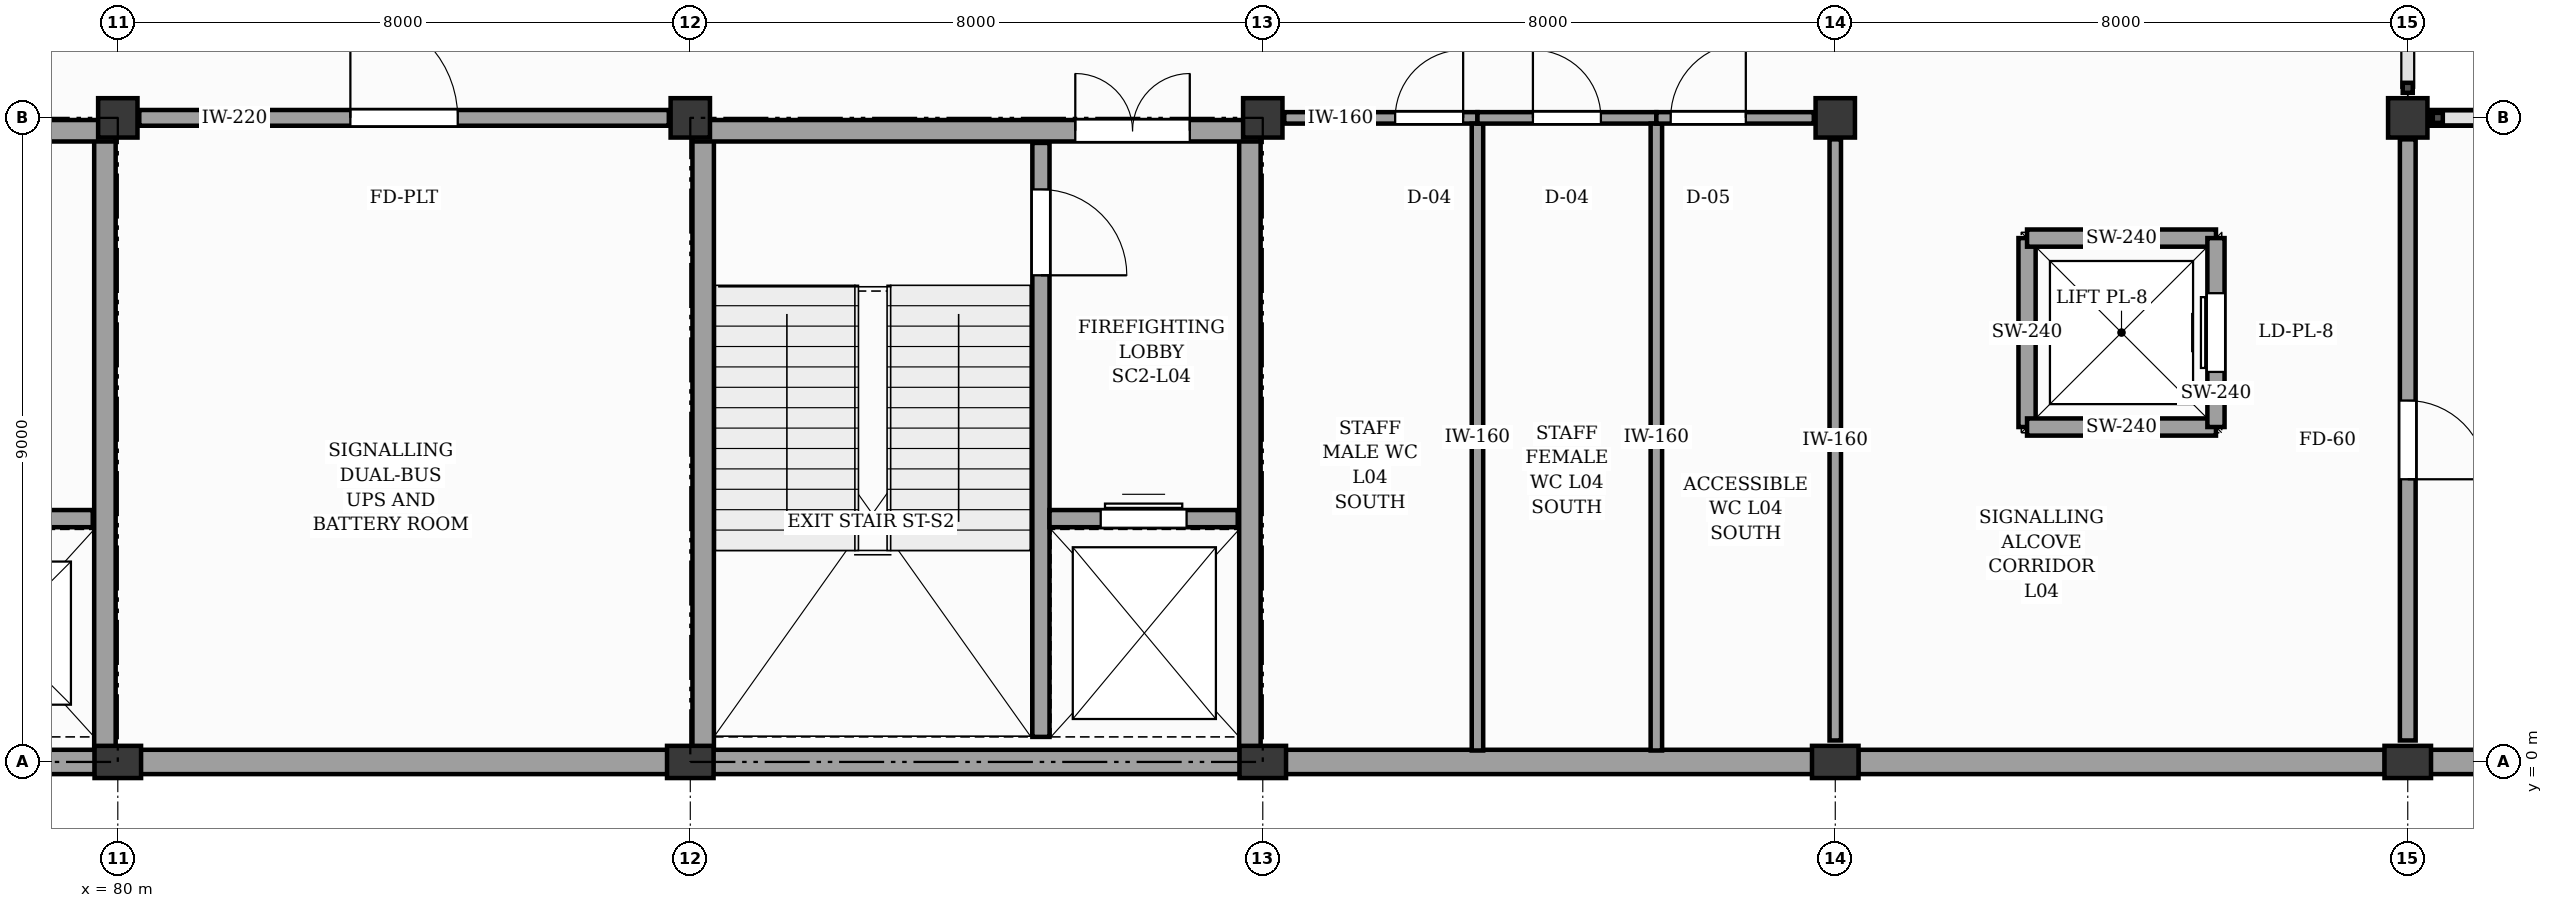
"""IFC4 building model, lengths in metres.
Left out: names, types, materials, properties, quantities, classifications, styles, units other than length and angle.
Written with IfcOpenShell. Run it as: python <this file> out.ifc"""

import sys

from ifc_helpers import new_model, si_unit, direction, frame, frame_2d, origin, origin_2d, place, context, subcontext, project, spatial, rectangle, extrude, element, fill, save


model = new_model("IFC4")
c1 = context("Model", 3, precision=1e-05, world=origin(), true_north=direction((0.0, 1.0)))
c2 = subcontext(c1, "Body", "Model", "MODEL_VIEW")
j1 = project(units=[si_unit("LENGTHUNIT", "METRE"), si_unit("PLANEANGLEUNIT", "RADIAN")], contexts=[c1])
p1 = place(None, origin())
s1 = spatial("IfcSite", under=j1, at=p1, CompositionType="ELEMENT")
p2 = place(p1, origin())
s2 = spatial("IfcBuilding", under=s1, at=p2, CompositionType="ELEMENT")
p3 = place(p2, frame((0.0, 0.0, 20.4)))
s3 = spatial("IfcBuildingStorey", under=s2, at=p3, CompositionType="ELEMENT", Elevation=20.4)
p4 = place(p3, frame((80.0, 0.0, 0.0), z_axis=(0.0, 0.0, 1.0), x_axis=(1.0, 0.0, 0.0)))
e1 = element("IfcColumn", 1, at=p4, inside=s3, PredefinedType="PILASTER", context=c2, shape_type="SweptSolid", body=[
    extrude(rectangle(XDim=0.65, YDim=0.45, at=origin_2d()), origin(), (0.0, 0.0, 1.0), 4.2),
])
p5 = place(p3, frame((80.0, 9.0, 0.0), z_axis=(0.0, 0.0, 1.0), x_axis=(1.0, 0.0, 0.0)))
e2 = element("IfcColumn", 2, at=p5, inside=s3, PredefinedType="COLUMN", context=c2, shape_type="SweptSolid", body=[
    extrude(rectangle(XDim=0.55, YDim=0.55, at=origin_2d()), origin(), (0.0, 0.0, 1.0), 4.2),
])
p6 = place(p3, frame((88.0, 0.0, 0.0), z_axis=(0.0, 0.0, 1.0), x_axis=(1.0, 0.0, 0.0)))
e3 = element("IfcColumn", 3, at=p6, inside=s3, PredefinedType="PILASTER", context=c2, shape_type="SweptSolid", body=[
    extrude(rectangle(XDim=0.65, YDim=0.45, at=origin_2d()), origin(), (0.0, 0.0, 1.0), 4.2),
])
p7 = place(p3, frame((88.0, 9.0, 0.0), z_axis=(0.0, 0.0, 1.0), x_axis=(1.0, 0.0, 0.0)))
e4 = element("IfcColumn", 4, at=p7, inside=s3, PredefinedType="COLUMN", context=c2, shape_type="SweptSolid", body=[
    extrude(rectangle(XDim=0.55, YDim=0.55, at=origin_2d()), origin(), (0.0, 0.0, 1.0), 4.2),
])
p8 = place(p3, frame((96.0, 0.0, 0.0), z_axis=(0.0, 0.0, 1.0), x_axis=(1.0, 0.0, 0.0)))
e5 = element("IfcColumn", 5, at=p8, inside=s3, PredefinedType="PILASTER", context=c2, shape_type="SweptSolid", body=[
    extrude(rectangle(XDim=0.65, YDim=0.45, at=origin_2d()), origin(), (0.0, 0.0, 1.0), 4.2),
])
p9 = place(p3, frame((96.0, 9.0, 0.0), z_axis=(0.0, 0.0, 1.0), x_axis=(1.0, 0.0, 0.0)))
e6 = element("IfcColumn", 6, at=p9, inside=s3, PredefinedType="COLUMN", context=c2, shape_type="SweptSolid", body=[
    extrude(rectangle(XDim=0.55, YDim=0.55, at=origin_2d()), origin(), (0.0, 0.0, 1.0), 4.2),
])
p10 = place(p3, frame((104.0, 0.0, 0.0), z_axis=(0.0, 0.0, 1.0), x_axis=(1.0, 0.0, 0.0)))
e7 = element("IfcColumn", 7, at=p10, inside=s3, PredefinedType="PILASTER", context=c2, shape_type="SweptSolid", body=[
    extrude(rectangle(XDim=0.65, YDim=0.45, at=origin_2d()), origin(), (0.0, 0.0, 1.0), 4.2),
])
p11 = place(p3, frame((104.0, 9.0, 0.0), z_axis=(0.0, 0.0, 1.0), x_axis=(1.0, 0.0, 0.0)))
e8 = element("IfcColumn", 8, at=p11, inside=s3, PredefinedType="COLUMN", context=c2, shape_type="SweptSolid", body=[
    extrude(rectangle(XDim=0.55, YDim=0.55, at=origin_2d()), origin(), (0.0, 0.0, 1.0), 4.2),
])
p12 = place(p3, frame((112.0, 0.0, 0.0), z_axis=(0.0, 0.0, 1.0), x_axis=(1.0, 0.0, 0.0)))
e9 = element("IfcColumn", 9, at=p12, inside=s3, PredefinedType="PILASTER", context=c2, shape_type="SweptSolid", body=[
    extrude(rectangle(XDim=0.65, YDim=0.45, at=origin_2d()), origin(), (0.0, 0.0, 1.0), 4.2),
])
p13 = place(p3, frame((112.0, 9.0, 0.0), z_axis=(0.0, 0.0, 1.0), x_axis=(1.0, 0.0, 0.0)))
e10 = element("IfcColumn", 10, at=p13, inside=s3, PredefinedType="COLUMN", context=c2, shape_type="SweptSolid", body=[
    extrude(rectangle(XDim=0.55, YDim=0.55, at=origin_2d()), origin(), (0.0, 0.0, 1.0), 4.2),
])
for number, where, z_axis, x_axis in (
    (11, (72.32, 0.0, 0.0), (0.0, 0.0, 1.0), (1.0, 0.0, 0.0)),
    (12, (80.32, 0.0, 0.0), (0.0, 0.0, 1.0), (1.0, 0.0, 0.0)),
    (13, (88.32, 0.0, 0.0), (0.0, 0.0, 1.0), (1.0, 0.0, 0.0)),
    (14, (96.32, 0.0, 0.0), (0.0, 0.0, 1.0), (1.0, 0.0, 0.0)),
    (15, (104.32, 0.0, 0.0), (0.0, 0.0, 1.0), (1.0, 0.0, 0.0)),
    (16, (112.32, 0.0, 0.0), (0.0, 0.0, 1.0), (1.0, 0.0, 0.0)),
):
    element("IfcWall", number, at=place(p3, frame(where, z_axis=z_axis, x_axis=x_axis)), inside=s3, PredefinedType="SOLIDWALL", context=c2, shape_type="SweptSolid", body=[
        extrude(rectangle(XDim=7.36, YDim=0.34, at=frame_2d((3.68, 0.0))), origin(), (0.0, 0.0, 1.0), 3.18),
    ])
p14 = place(p3, frame((92.9, 0.35, 0.0), z_axis=(0.0, 0.0, 1.0), x_axis=(0.0, 1.0, 0.0)))
e17 = element("IfcWall", 17, at=p14, inside=s3, PredefinedType="SHEAR", context=c2, shape_type="SweptSolid", body=[
    extrude(rectangle(XDim=8.3, YDim=0.24, at=frame_2d((4.15, 0.0))), origin(), (0.0, 0.0, 1.0), 3.92),
])
p15 = place(p14, frame((6.45, 0.0, 0.0)))
e18 = element("IfcOpeningElement", 18, at=p15, cuts=e17, PredefinedType="OPENING", context=c2, shape_type="SweptSolid", body=[
    extrude(rectangle(XDim=1.2, YDim=2.15, at=frame_2d((0.6, 1.075))), frame((0.0, 0.13, 0.0), z_axis=(0.0, -1.0, 0.0), x_axis=(1.0, 0.0, 0.0)), (0.0, 0.0, 1.0), 0.26),
])
p16 = place(p3, frame((93.02, 3.4, 0.0), z_axis=(0.0, 0.0, 1.0), x_axis=(1.0, 0.0, 0.0)))
e19 = element("IfcWall", 19, at=p16, inside=s3, PredefinedType="SHEAR", context=c2, shape_type="SweptSolid", body=[
    extrude(rectangle(XDim=2.63, YDim=0.24, at=frame_2d((1.315, 0.0))), origin(), (0.0, 0.0, 1.0), 3.92),
])
p17 = place(p16, frame((0.715, 0.0, 0.0)))
e20 = element("IfcOpeningElement", 20, at=p17, cuts=e19, PredefinedType="OPENING", context=c2, shape_type="SweptSolid", body=[
    extrude(rectangle(XDim=1.2, YDim=2.15, at=frame_2d((0.6, 1.075))), frame((0.0, 0.13, 0.0), z_axis=(0.0, -1.0, 0.0), x_axis=(1.0, 0.0, 0.0)), (0.0, 0.0, 1.0), 0.26),
])
for number, where, z_axis, x_axis in (
    (21, (88.18, 0.18, 0.0), (0.0, 0.0, 1.0), (0.0, 1.0, 0.0)),
    (22, (95.82, 0.18, 0.0), (0.0, 0.0, 1.0), (0.0, 1.0, 0.0)),
):
    element("IfcWall", number, at=place(p3, frame(where, z_axis=z_axis, x_axis=x_axis)), inside=s3, PredefinedType="SHEAR", context=c2, shape_type="SweptSolid", body=[
        extrude(rectangle(XDim=8.64, YDim=0.3, at=frame_2d((4.32, 0.0))), origin(), (0.0, 0.0, 1.0), 3.92),
    ])
p18 = place(p3, frame((88.03, 8.82, 0.0), z_axis=(0.0, 0.0, 1.0), x_axis=(1.0, 0.0, 0.0)))
e23 = element("IfcWall", 23, at=p18, inside=s3, PredefinedType="SHEAR", context=c2, shape_type="SweptSolid", body=[
    extrude(rectangle(XDim=7.94, YDim=0.3, at=frame_2d((3.97, 0.0))), origin(), (0.0, 0.0, 1.0), 3.92),
])
p19 = place(p18, frame((5.35, 0.0, 0.0)))
e24 = element("IfcOpeningElement", 24, at=p19, cuts=e23, PredefinedType="OPENING", context=c2, shape_type="SweptSolid", body=[
    extrude(rectangle(XDim=1.6, YDim=2.15, at=frame_2d((0.8, 1.075))), frame((0.0, 0.16, 0.0), z_axis=(0.0, -1.0, 0.0), x_axis=(1.0, 0.0, 0.0)), (0.0, 0.0, 1.0), 0.32),
])
p20 = place(p3, frame((77.02, 3.4, 0.0), z_axis=(0.0, 0.0, 1.0), x_axis=(1.0, 0.0, 0.0)))
e25 = element("IfcWall", 25, at=p20, inside=s3, PredefinedType="SHEAR", context=c2, shape_type="SweptSolid", body=[
    extrude(rectangle(XDim=2.63, YDim=0.24, at=frame_2d((1.315, 0.0))), origin(), (0.0, 0.0, 1.0), 3.98),
])
p21 = place(p20, frame((0.765, 0.0, 0.0)))
e26 = element("IfcOpeningElement", 26, at=p21, cuts=e25, PredefinedType="OPENING", context=c2, shape_type="SweptSolid", body=[
    extrude(rectangle(XDim=1.1, YDim=2.15, at=frame_2d((0.55, 1.075))), frame((0.0, 0.13, 0.0), z_axis=(0.0, -1.0, 0.0), x_axis=(1.0, 0.0, 0.0)), (0.0, 0.0, 1.0), 0.26),
])
p22 = place(p3, frame((79.82, 0.18, 0.0), z_axis=(0.0, 0.0, 1.0), x_axis=(0.0, 1.0, 0.0)))
e27 = element("IfcWall", 27, at=p22, inside=s3, PredefinedType="SHEAR", context=c2, shape_type="SweptSolid", body=[
    extrude(rectangle(XDim=8.64, YDim=0.3, at=frame_2d((4.32, 0.0))), origin(), (0.0, 0.0, 1.0), 3.98),
])
p23 = place(p3, frame((72.03, 8.82, 0.0), z_axis=(0.0, 0.0, 1.0), x_axis=(1.0, 0.0, 0.0)))
e28 = element("IfcWall", 28, at=p23, inside=s3, PredefinedType="SHEAR", context=c2, shape_type="SweptSolid", body=[
    extrude(rectangle(XDim=7.94, YDim=0.3, at=frame_2d((3.97, 0.0))), origin(), (0.0, 0.0, 1.0), 3.98),
])
p24 = place(p23, frame((5.35, 0.0, 0.0)))
e29 = element("IfcOpeningElement", 29, at=p24, cuts=e28, PredefinedType="OPENING", context=c2, shape_type="SweptSolid", body=[
    extrude(rectangle(XDim=1.6, YDim=2.15, at=frame_2d((0.8, 1.075))), frame((0.0, 0.16, 0.0), z_axis=(0.0, -1.0, 0.0), x_axis=(1.0, 0.0, 0.0)), (0.0, 0.0, 1.0), 0.32),
])
for number, where, z_axis, x_axis in (
    (30, (106.68, 4.68, 0.0), (0.0, 0.0, 1.0), (0.0, 1.0, 0.0)),
    (31, (106.68, 4.68, 0.0), (0.0, 0.0, 1.0), (1.0, 0.0, 0.0)),
    (32, (106.68, 7.32, 0.0), (0.0, 0.0, 1.0), (1.0, 0.0, 0.0)),
):
    element("IfcWall", number, at=place(p3, frame(where, z_axis=z_axis, x_axis=x_axis)), inside=s3, PredefinedType="SHEAR", context=c2, shape_type="SweptSolid", body=[
        extrude(rectangle(XDim=2.64, YDim=0.24, at=frame_2d((1.32, 0.0))), origin(), (0.0, 0.0, 1.0), 3.92),
    ])
p25 = place(p3, frame((109.32, 4.68, 0.0), z_axis=(0.0, 0.0, 1.0), x_axis=(0.0, 1.0, 0.0)))
e33 = element("IfcWall", 33, at=p25, inside=s3, PredefinedType="SHEAR", context=c2, shape_type="SweptSolid", body=[
    extrude(rectangle(XDim=2.64, YDim=0.24, at=frame_2d((1.32, 0.0))), origin(), (0.0, 0.0, 1.0), 3.92),
])
p26 = place(p25, frame((0.77, 0.0, 0.0)))
e34 = element("IfcOpeningElement", 34, at=p26, cuts=e33, PredefinedType="OPENING", context=c2, shape_type="SweptSolid", body=[
    extrude(rectangle(XDim=1.1, YDim=2.15, at=frame_2d((0.55, 1.075))), frame((0.0, 0.13, 0.0), z_axis=(0.0, -1.0, 0.0), x_axis=(1.0, 0.0, 0.0)), (0.0, 0.0, 1.0), 0.26),
])
p27 = place(p3, frame((80.3, 9.0, 0.0), z_axis=(0.0, 0.0, 1.0), x_axis=(1.0, 0.0, 0.0)))
e35 = element("IfcWall", 35, at=p27, inside=s3, PredefinedType="SOLIDWALL", context=c2, shape_type="SweptSolid", body=[
    extrude(rectangle(XDim=7.4, YDim=0.22, at=frame_2d((3.7, 0.0))), origin(), (0.0, 0.0, 1.0), 3.1),
])
p28 = place(p27, frame((2.95, 0.0, 0.0)))
e36 = element("IfcOpeningElement", 36, at=p28, cuts=e35, PredefinedType="OPENING", context=c2, shape_type="SweptSolid", body=[
    extrude(rectangle(XDim=1.5, YDim=2.2, at=frame_2d((0.75, 1.1))), frame((0.0, 0.12, 0.0), z_axis=(0.0, -1.0, 0.0), x_axis=(1.0, 0.0, 0.0)), (0.0, 0.0, 1.0), 0.24),
])
p29 = place(p3, frame((96.3, 9.0, 0.0), z_axis=(0.0, 0.0, 1.0), x_axis=(1.0, 0.0, 0.0)))
e37 = element("IfcWall", 37, at=p29, inside=s3, PredefinedType="PARTITIONING", context=c2, shape_type="SweptSolid", body=[
    extrude(rectangle(XDim=2.7, YDim=0.16, at=frame_2d((1.35, 0.0))), origin(), (0.0, 0.0, 1.0), 3.1),
])
p30 = place(p29, frame((1.55, 0.0, 0.0)))
e38 = element("IfcOpeningElement", 38, at=p30, cuts=e37, PredefinedType="OPENING", context=c2, shape_type="SweptSolid", body=[
    extrude(rectangle(XDim=0.95, YDim=2.1, at=frame_2d((0.475, 1.05))), frame((0.0, 0.09, 0.0), z_axis=(0.0, -1.0, 0.0), x_axis=(1.0, 0.0, 0.0)), (0.0, 0.0, 1.0), 0.18),
])
p31 = place(p3, frame((99.0, 0.16, 0.0), z_axis=(0.0, 0.0, 1.0), x_axis=(0.0, 1.0, 0.0)))
e39 = element("IfcWall", 39, at=p31, inside=s3, PredefinedType="PARTITIONING", context=c2, shape_type="SweptSolid", body=[
    extrude(rectangle(XDim=8.76, YDim=0.16, at=frame_2d((4.38, 0.0))), origin(), (0.0, 0.0, 1.0), 3.1),
])
p32 = place(p3, frame((99.0, 9.0, 0.0), z_axis=(0.0, 0.0, 1.0), x_axis=(1.0, 0.0, 0.0)))
e40 = element("IfcWall", 40, at=p32, inside=s3, PredefinedType="PARTITIONING", context=c2, shape_type="SweptSolid", body=[
    extrude(rectangle(XDim=2.5, YDim=0.16, at=frame_2d((1.25, 0.0))), origin(), (0.0, 0.0, 1.0), 3.1),
])
p33 = place(p32, frame((0.775, 0.0, 0.0)))
e41 = element("IfcOpeningElement", 41, at=p33, cuts=e40, PredefinedType="OPENING", context=c2, shape_type="SweptSolid", body=[
    extrude(rectangle(XDim=0.95, YDim=2.1, at=frame_2d((0.475, 1.05))), frame((0.0, 0.09, 0.0), z_axis=(0.0, -1.0, 0.0), x_axis=(1.0, 0.0, 0.0)), (0.0, 0.0, 1.0), 0.18),
])
p34 = place(p3, frame((101.5, 0.16, 0.0), z_axis=(0.0, 0.0, 1.0), x_axis=(0.0, 1.0, 0.0)))
e42 = element("IfcWall", 42, at=p34, inside=s3, PredefinedType="PARTITIONING", context=c2, shape_type="SweptSolid", body=[
    extrude(rectangle(XDim=8.76, YDim=0.16, at=frame_2d((4.38, 0.0))), origin(), (0.0, 0.0, 1.0), 3.1),
])
p35 = place(p3, frame((101.5, 9.0, 0.0), z_axis=(0.0, 0.0, 1.0), x_axis=(1.0, 0.0, 0.0)))
e43 = element("IfcWall", 43, at=p35, inside=s3, PredefinedType="PARTITIONING", context=c2, shape_type="SweptSolid", body=[
    extrude(rectangle(XDim=2.2, YDim=0.16, at=frame_2d((1.1, 0.0))), origin(), (0.0, 0.0, 1.0), 3.1),
])
p36 = place(p35, frame((0.2, 0.0, 0.0)))
e44 = element("IfcOpeningElement", 44, at=p36, cuts=e43, PredefinedType="OPENING", context=c2, shape_type="SweptSolid", body=[
    extrude(rectangle(XDim=1.05, YDim=2.1, at=frame_2d((0.525, 1.05))), frame((0.0, 0.09, 0.0), z_axis=(0.0, -1.0, 0.0), x_axis=(1.0, 0.0, 0.0)), (0.0, 0.0, 1.0), 0.18),
])
p37 = place(p3, frame((104.0, 0.3, 0.0), z_axis=(0.0, 0.0, 1.0), x_axis=(0.0, 1.0, 0.0)))
e45 = element("IfcWall", 45, at=p37, inside=s3, PredefinedType="PARTITIONING", context=c2, shape_type="SweptSolid", body=[
    extrude(rectangle(XDim=8.4, YDim=0.16, at=frame_2d((4.2, 0.0))), origin(), (0.0, 0.0, 1.0), 3.1),
])
p38 = place(p3, frame((112.3, 9.0, 0.0), z_axis=(0.0, 0.0, 1.0), x_axis=(1.0, 0.0, 0.0)))
e46 = element("IfcWall", 46, at=p38, inside=s3, PredefinedType="SOLIDWALL", context=c2, shape_type="SweptSolid", body=[
    extrude(rectangle(XDim=7.4, YDim=0.22, at=frame_2d((3.7, 0.0))), origin(), (0.0, 0.0, 1.0), 3.1),
])
p39 = place(p3, frame((112.0, 0.3, 0.0), z_axis=(0.0, 0.0, 1.0), x_axis=(0.0, 1.0, 0.0)))
e47 = element("IfcWall", 47, at=p39, inside=s3, PredefinedType="SOLIDWALL", context=c2, shape_type="SweptSolid", body=[
    extrude(rectangle(XDim=8.4, YDim=0.22, at=frame_2d((4.2, 0.0))), origin(), (0.0, 0.0, 1.0), 3.1),
])
p40 = place(p39, frame((3.65, 0.0, 0.0)))
e48 = element("IfcOpeningElement", 48, at=p40, cuts=e47, PredefinedType="OPENING", context=c2, shape_type="SweptSolid", body=[
    extrude(rectangle(XDim=1.1, YDim=2.15, at=frame_2d((0.55, 1.075))), frame((0.0, 0.12, 0.0), z_axis=(0.0, -1.0, 0.0), x_axis=(1.0, 0.0, 0.0)), (0.0, 0.0, 1.0), 0.24),
])
p41 = place(p15, frame((1.2, 0.0, 0.0), z_axis=(0.0, 0.0, 1.0), x_axis=(-1.0, 0.0, 0.0)))
e49 = element("IfcDoor", 49, at=p41, inside=s3, OperationType="SINGLE_SWING_LEFT", PredefinedType="DOOR", context=c2, shape_type="SweptSolid", body=[
    extrude(rectangle(XDim=1.2, YDim=2.15, at=frame_2d((0.6, 1.075))), frame((0.0, 0.025, 0.0), z_axis=(0.0, -1.0, 0.0), x_axis=(1.0, 0.0, 0.0)), (0.0, 0.0, 1.0), 0.05),
])
fill(e18, e49)
p42 = place(p17, origin())
e50 = element("IfcDoor", 50, at=p42, inside=s3, OperationType="DOUBLE_DOOR_SLIDING", PredefinedType="DOOR", context=c2, shape_type="SweptSolid", body=[
    extrude(rectangle(XDim=1.2, YDim=2.15, at=frame_2d((0.6, 1.075))), frame((0.0, 0.025, 0.0), z_axis=(0.0, -1.0, 0.0), x_axis=(1.0, 0.0, 0.0)), (0.0, 0.0, 1.0), 0.05),
])
fill(e20, e50)
p43 = place(p19, origin())
e51 = element("IfcDoor", 51, at=p43, inside=s3, OperationType="DOUBLE_DOOR_SINGLE_SWING", PredefinedType="DOOR", context=c2, shape_type="SweptSolid", body=[
    extrude(rectangle(XDim=1.6, YDim=2.15, at=frame_2d((0.8, 1.075))), frame((0.0, 0.025, 0.0), z_axis=(0.0, -1.0, 0.0), x_axis=(1.0, 0.0, 0.0)), (0.0, 0.0, 1.0), 0.05),
])
fill(e24, e51)
p44 = place(p26, origin())
e52 = element("IfcDoor", 52, at=p44, inside=s3, OperationType="DOUBLE_DOOR_SLIDING", PredefinedType="DOOR", context=c2, shape_type="SweptSolid", body=[
    extrude(rectangle(XDim=1.1, YDim=2.15, at=frame_2d((0.55, 1.075))), frame((0.0, 0.025, 0.0), z_axis=(0.0, -1.0, 0.0), x_axis=(1.0, 0.0, 0.0)), (0.0, 0.0, 1.0), 0.05),
])
fill(e34, e52)
p45 = place(p28, origin())
e53 = element("IfcDoor", 53, at=p45, inside=s3, OperationType="SINGLE_SWING_LEFT", PredefinedType="DOOR", context=c2, shape_type="SweptSolid", body=[
    extrude(rectangle(XDim=1.5, YDim=2.2, at=frame_2d((0.75, 1.1))), frame((0.0, 0.025, 0.0), z_axis=(0.0, -1.0, 0.0), x_axis=(1.0, 0.0, 0.0)), (0.0, 0.0, 1.0), 0.05),
])
fill(e36, e53)
p46 = place(p30, origin())
e54 = element("IfcDoor", 54, at=p46, inside=s3, OperationType="SINGLE_SWING_RIGHT", PredefinedType="DOOR", context=c2, shape_type="SweptSolid", body=[
    extrude(rectangle(XDim=0.95, YDim=2.1, at=frame_2d((0.475, 1.05))), frame((0.0, 0.025, 0.0), z_axis=(0.0, -1.0, 0.0), x_axis=(1.0, 0.0, 0.0)), (0.0, 0.0, 1.0), 0.05),
])
fill(e38, e54)
p47 = place(p33, origin())
e55 = element("IfcDoor", 55, at=p47, inside=s3, OperationType="SINGLE_SWING_LEFT", PredefinedType="DOOR", context=c2, shape_type="SweptSolid", body=[
    extrude(rectangle(XDim=0.95, YDim=2.1, at=frame_2d((0.475, 1.05))), frame((0.0, 0.025, 0.0), z_axis=(0.0, -1.0, 0.0), x_axis=(1.0, 0.0, 0.0)), (0.0, 0.0, 1.0), 0.05),
])
fill(e41, e55)
p48 = place(p36, origin())
e56 = element("IfcDoor", 56, at=p48, inside=s3, OperationType="SINGLE_SWING_RIGHT", PredefinedType="DOOR", context=c2, shape_type="SweptSolid", body=[
    extrude(rectangle(XDim=1.05, YDim=2.1, at=frame_2d((0.525, 1.05))), frame((0.0, 0.025, 0.0), z_axis=(0.0, -1.0, 0.0), x_axis=(1.0, 0.0, 0.0)), (0.0, 0.0, 1.0), 0.05),
])
fill(e44, e56)
p49 = place(p40, frame((1.1, 0.0, 0.0), z_axis=(0.0, 0.0, 1.0), x_axis=(-1.0, 0.0, 0.0)))
e57 = element("IfcDoor", 57, at=p49, inside=s3, OperationType="SINGLE_SWING_LEFT", PredefinedType="DOOR", context=c2, shape_type="SweptSolid", body=[
    extrude(rectangle(XDim=1.1, YDim=2.15, at=frame_2d((0.55, 1.075))), frame((0.0, 0.025, 0.0), z_axis=(0.0, -1.0, 0.0), x_axis=(1.0, 0.0, 0.0)), (0.0, 0.0, 1.0), 0.05),
])
fill(e48, e57)
save(model, sys.argv[1])
